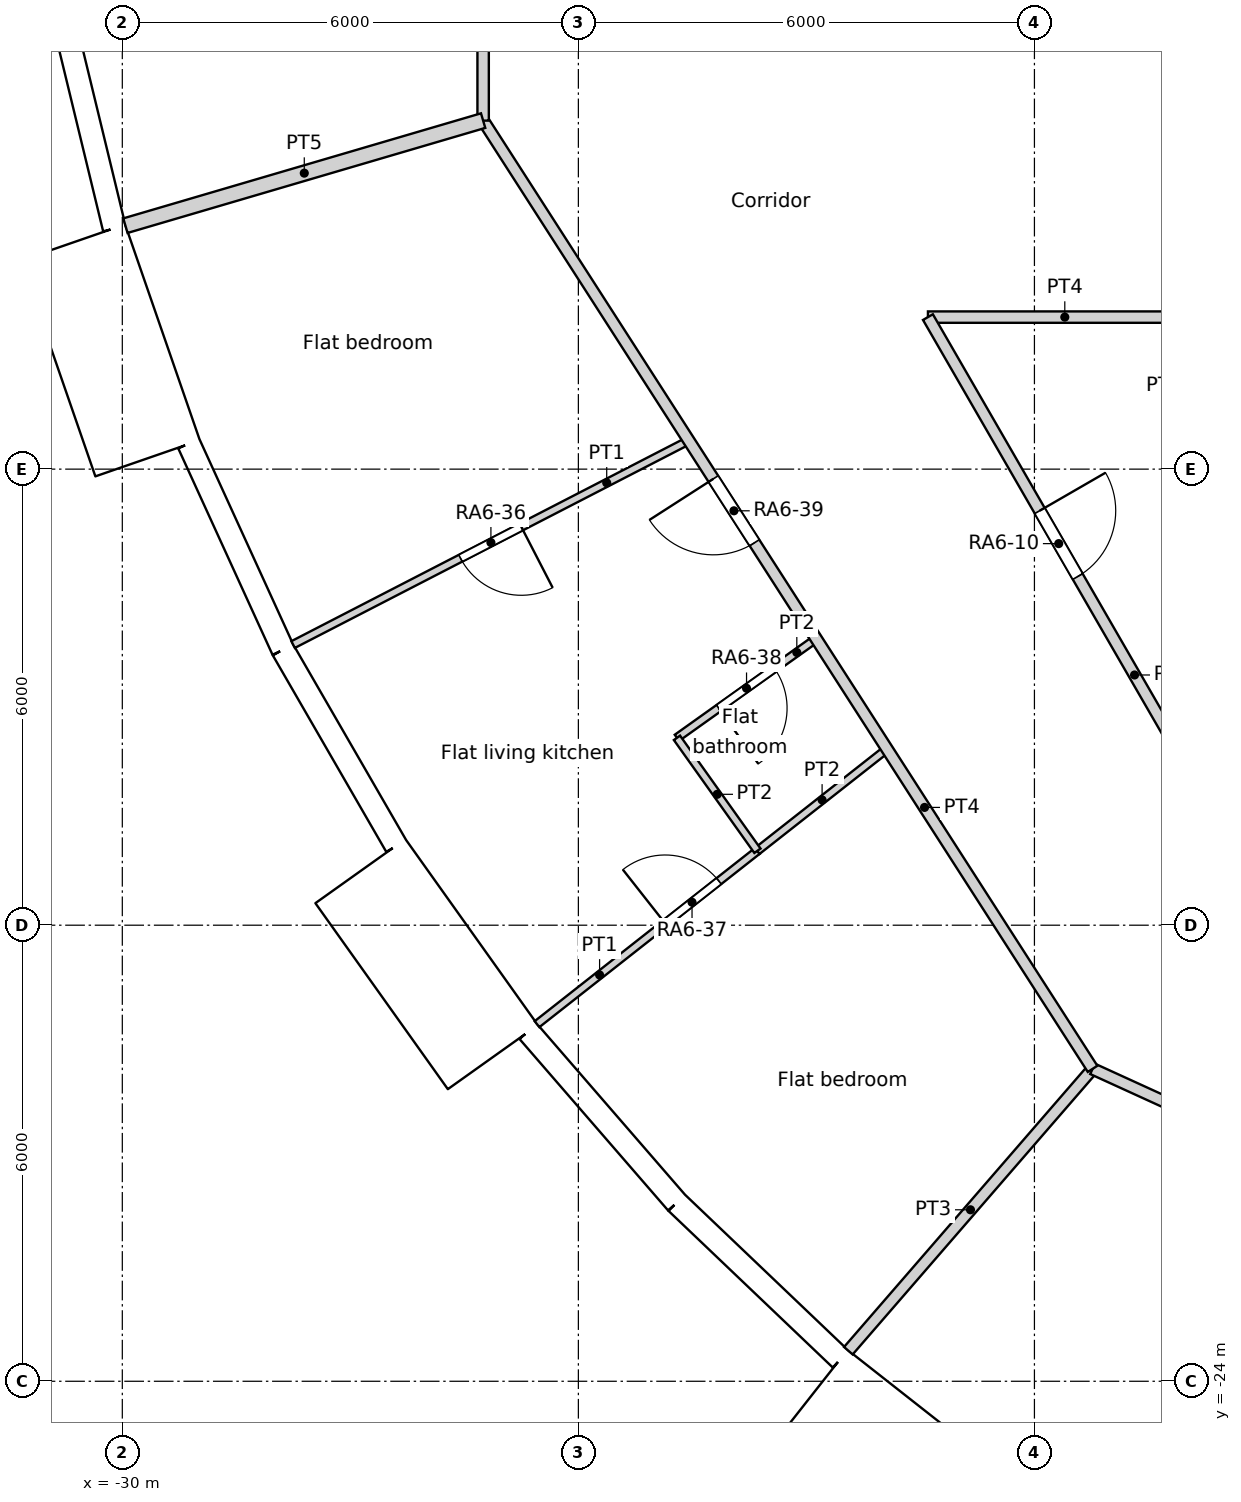
"""IFC4 building model, lengths in metres.
Left out: names, types, materials, properties, quantities, classifications, styles, units other than length and angle.
Written with IfcOpenShell. Run it as: python <this file> out.ifc"""

import sys

from ifc_helpers import new_model, si_unit, direction, frame, frame_2d, origin, origin_2d, place, context, subcontext, project, spatial, rectangle, circle, extrude, element, fill, save


model = new_model("IFC4")
c1 = context("Model", 3, precision=1e-05, world=origin(), true_north=direction((0.0, 1.0)))
c2 = subcontext(c1, "Body", "Model", "MODEL_VIEW")
j1 = project(units=[si_unit("LENGTHUNIT", "METRE"), si_unit("PLANEANGLEUNIT", "RADIAN")], contexts=[c1])
p1 = place(None, origin())
s1 = spatial("IfcSite", under=j1, at=p1, CompositionType="ELEMENT")
p2 = place(p1, origin())
s2 = spatial("IfcBuilding", under=s1, at=p2, CompositionType="ELEMENT")
p3 = place(p2, frame((0.0, 0.0, 82.2)))
s3 = spatial("IfcBuildingStorey", under=s2, at=p3, CompositionType="ELEMENT", Elevation=82.2)
for number, where, z_axis, x_axis in (
    (1, (-29.048, -8.529, 0.0), (0.0, 0.0, 1.0), (1.0, 0.0, 0.0)),
    (2, (-26.909, -13.873, 0.0), (0.0, 0.0, 1.0), (1.0, 0.0, 0.0)),
    (3, (-23.797, -18.715, 0.0), (0.0, 0.0, 1.0), (1.0, 0.0, 0.0)),
    (4, (-19.826, -22.88, 0.0), (0.0, 0.0, 1.0), (1.0, 0.0, 0.0)),
):
    element("IfcColumn", number, at=place(p3, frame(where, z_axis=z_axis, x_axis=x_axis)), inside=s3, PredefinedType="COLUMN", context=c2, shape_type="SweptSolid", body=[
        extrude(circle(Radius=0.6, at=origin_2d()), origin(), (0.0, 0.0, 1.0), 3.6),
    ])
for number, where, z_axis, x_axis in (
    (5, (-23.067, -8.396, 0.0), (0.0, 0.0, 1.0), (1.0, 0.0, 0.0)),
    (6, (-20.509, -13.489, 0.0), (0.0, 0.0, 1.0), (1.0, 0.0, 0.0)),
    (7, (-16.846, -17.855, 0.0), (0.0, 0.0, 1.0), (1.0, 0.0, 0.0)),
):
    element("IfcColumn", number, at=place(p3, frame(where, z_axis=z_axis, x_axis=x_axis)), inside=s3, PredefinedType="COLUMN", context=c2, shape_type="SweptSolid", body=[
        extrude(circle(Radius=0.65, at=origin_2d()), origin(), (0.0, 0.0, 1.0), 3.6),
    ])
p4 = place(p3, frame((-16.958, -8.167, 0.0), z_axis=(0.0, 0.0, 1.0), x_axis=(1.0, 0.0, 0.0)))
e8 = element("IfcColumn", 8, at=p4, inside=s3, PredefinedType="COLUMN", context=c2, shape_type="SweptSolid", body=[
    extrude(circle(Radius=0.7, at=origin_2d()), origin(), (0.0, 0.0, 1.0), 3.6),
])
p5 = place(p3, frame((-30.807, -5.938, 0.0), z_axis=(0.0, 0.0, 1.0), x_axis=(0.235743081534, -0.971815414319, 0.0)))
e9 = element("IfcWall", 9, at=p5, inside=s3, PredefinedType="SOLIDWALL", context=c2, shape_type="SweptSolid", body=[
    extrude(rectangle(XDim=2.979, YDim=0.3, at=frame_2d((1.49, 0.0))), origin(), (0.0, 0.0, 1.0), 3.15),
])
p6 = place(p5, frame((1.49, 0.0, 1.55)))
e10 = element("IfcOpeningElement", 10, at=p6, cuts=e9, PredefinedType="OPENING", context=c2, shape_type="SweptSolid", body=[
    extrude(circle(Radius=0.9, at=origin_2d()), frame((0.0, 0.16, 0.0), z_axis=(0.0, -1.0, 0.0), x_axis=(1.0, 0.0, 0.0)), (0.0, 0.0, 1.0), 0.32),
])
p7 = place(p3, frame((-30.649, -9.021, -0.45), z_axis=(0.0, 0.0, 1.0), x_axis=(0.327071431777, -0.944999618262, 0.0)))
e11 = element("IfcWall", 11, at=p7, inside=s3, PredefinedType="ELEMENTEDWALL", context=c2, shape_type="SweptSolid", body=[
    extrude(rectangle(XDim=3.0, YDim=1.45, at=frame_2d((1.5, 0.0))), origin(), (0.0, 0.0, 1.0), 3.6),
])
p8 = place(p7, frame((1.5, 0.0, 2.0)))
e12 = element("IfcOpeningElement", 12, at=p8, cuts=e11, PredefinedType="OPENING", context=c2, shape_type="SweptSolid", body=[
    extrude(circle(Radius=0.9, at=origin_2d()), frame((0.0, 0.735, 0.0), z_axis=(0.0, -1.0, 0.0), x_axis=(1.0, 0.0, 0.0)), (0.0, 0.0, 1.0), 1.47),
])
p9 = place(p3, frame((-29.125, -11.666, 0.0), z_axis=(0.0, 0.0, 1.0), x_axis=(0.415407317162, -0.909635509888, 0.0)))
e13 = element("IfcWall", 13, at=p9, inside=s3, PredefinedType="SOLIDWALL", context=c2, shape_type="SweptSolid", body=[
    extrude(rectangle(XDim=2.98, YDim=0.3, at=frame_2d((1.49, 0.0))), origin(), (0.0, 0.0, 1.0), 3.15),
])
p10 = place(p9, frame((1.49, 0.0, 1.55)))
e14 = element("IfcOpeningElement", 14, at=p10, cuts=e13, PredefinedType="OPENING", context=c2, shape_type="SweptSolid", body=[
    extrude(circle(Radius=0.9, at=origin_2d()), frame((0.0, 0.16, 0.0), z_axis=(0.0, -1.0, 0.0), x_axis=(1.0, 0.0, 0.0)), (0.0, 0.0, 1.0), 0.32),
])
p11 = place(p3, frame((-27.887, -14.377, 0.0), z_axis=(0.0, 0.0, 1.0), x_axis=(0.499999078476, -0.866025935826, 0.0)))
e15 = element("IfcWall", 15, at=p11, inside=s3, PredefinedType="SOLIDWALL", context=c2, shape_type="SweptSolid", body=[
    extrude(rectangle(XDim=2.979, YDim=0.3, at=frame_2d((1.49, 0.0))), origin(), (0.0, 0.0, 1.0), 3.15),
])
p12 = place(p11, frame((1.49, 0.0, 1.55)))
e16 = element("IfcOpeningElement", 16, at=p12, cuts=e15, PredefinedType="OPENING", context=c2, shape_type="SweptSolid", body=[
    extrude(circle(Radius=0.9, at=origin_2d()), frame((0.0, 0.16, 0.0), z_axis=(0.0, -1.0, 0.0), x_axis=(1.0, 0.0, 0.0)), (0.0, 0.0, 1.0), 0.32),
])
p13 = place(p3, frame((-26.866, -17.29, -0.45), z_axis=(0.0, 0.0, 1.0), x_axis=(0.580090570606, -0.814551981088, 0.0)))
e17 = element("IfcWall", 17, at=p13, inside=s3, PredefinedType="ELEMENTEDWALL", context=c2, shape_type="SweptSolid", body=[
    extrude(rectangle(XDim=3.0, YDim=1.45, at=frame_2d((1.5, 0.0))), origin(), (0.0, 0.0, 1.0), 3.6),
])
p14 = place(p13, frame((1.5, 0.0, 2.0)))
e18 = element("IfcOpeningElement", 18, at=p14, cuts=e17, PredefinedType="OPENING", context=c2, shape_type="SweptSolid", body=[
    extrude(circle(Radius=0.9, at=origin_2d()), frame((0.0, 0.735, 0.0), z_axis=(0.0, -1.0, 0.0), x_axis=(1.0, 0.0, 0.0)), (0.0, 0.0, 1.0), 1.47),
])
p15 = place(p3, frame((-24.658, -19.399, 0.0), z_axis=(0.0, 0.0, 1.0), x_axis=(0.654830712471, -0.755775587066, 0.0)))
e19 = element("IfcWall", 19, at=p15, inside=s3, PredefinedType="SOLIDWALL", context=c2, shape_type="SweptSolid", body=[
    extrude(rectangle(XDim=2.98, YDim=0.3, at=frame_2d((1.49, 0.0))), origin(), (0.0, 0.0, 1.0), 3.15),
])
p16 = place(p15, frame((1.49, 0.0, 1.55)))
e20 = element("IfcOpeningElement", 20, at=p16, cuts=e19, PredefinedType="OPENING", context=c2, shape_type="SweptSolid", body=[
    extrude(circle(Radius=0.9, at=origin_2d()), frame((0.0, 0.16, 0.0), z_axis=(0.0, -1.0, 0.0), x_axis=(1.0, 0.0, 0.0)), (0.0, 0.0, 1.0), 0.32),
])
p17 = place(p3, frame((-22.707, -21.651, 0.0), z_axis=(0.0, 0.0, 1.0), x_axis=(0.723744206617, -0.690068346896, 0.0)))
e21 = element("IfcWall", 21, at=p17, inside=s3, PredefinedType="SOLIDWALL", context=c2, shape_type="SweptSolid", body=[
    extrude(rectangle(XDim=2.98, YDim=0.3, at=frame_2d((1.49, 0.0))), origin(), (0.0, 0.0, 1.0), 3.15),
])
p18 = place(p17, frame((1.49, 0.0, 1.55)))
e22 = element("IfcOpeningElement", 22, at=p18, cuts=e21, PredefinedType="OPENING", context=c2, shape_type="SweptSolid", body=[
    extrude(circle(Radius=0.9, at=origin_2d()), frame((0.0, 0.16, 0.0), z_axis=(0.0, -1.0, 0.0), x_axis=(1.0, 0.0, 0.0)), (0.0, 0.0, 1.0), 0.32),
])
p19 = place(p3, frame((-20.907, -24.159, -0.45), z_axis=(0.0, 0.0, 1.0), x_axis=(0.786049992888, -0.618162930529, 0.0)))
e23 = element("IfcWall", 23, at=p19, inside=s3, PredefinedType="ELEMENTEDWALL", context=c2, shape_type="SweptSolid", body=[
    extrude(rectangle(XDim=3.0, YDim=1.45, at=frame_2d((1.5, 0.0))), origin(), (0.0, 0.0, 1.0), 3.6),
])
p20 = place(p19, frame((1.5, 0.0, 2.0)))
e24 = element("IfcOpeningElement", 24, at=p20, cuts=e23, PredefinedType="OPENING", context=c2, shape_type="SweptSolid", body=[
    extrude(circle(Radius=0.9, at=origin_2d()), frame((0.0, 0.735, 0.0), z_axis=(0.0, -1.0, 0.0), x_axis=(1.0, 0.0, 0.0)), (0.0, 0.0, 1.0), 1.47),
])
p21 = place(p3, frame((-19.401, -10.0, 0.0), z_axis=(0.0, 0.0, 1.0), x_axis=(1.0, 0.0, 0.0)))
e25 = element("IfcWall", 25, at=p21, inside=s3, PredefinedType="PARTITIONING", context=c2, shape_type="SweptSolid", body=[
    extrude(rectangle(XDim=3.601, YDim=0.15, at=frame_2d((1.8, 0.0))), origin(), (0.0, 0.0, 1.0), 3.15),
])
p22 = place(p3, frame((-19.401, -10.0, 0.0), z_axis=(0.0, 0.0, 1.0), x_axis=(0.499992689227, -0.86602962462, 0.0)))
e26 = element("IfcWall", 26, at=p22, inside=s3, PredefinedType="PARTITIONING", context=c2, shape_type="SweptSolid", body=[
    extrude(rectangle(XDim=6.882, YDim=0.15, at=frame_2d((3.441, 0.0))), origin(), (0.0, 0.0, 1.0), 3.15),
])
p23 = place(p22, frame((2.941, 0.0, 0.0)))
e27 = element("IfcOpeningElement", 27, at=p23, cuts=e26, PredefinedType="OPENING", context=c2, shape_type="SweptSolid", body=[
    extrude(rectangle(XDim=1.0, YDim=2.04, at=frame_2d((0.5, 1.02))), frame((0.0, 0.075, 0.0), z_axis=(0.0, -1.0, 0.0), x_axis=(1.0, 0.0, 0.0)), (0.0, 0.0, 1.0), 0.15),
])
p24 = place(p3, frame((-25.253, -7.415, 0.0), z_axis=(0.0, 0.0, 1.0), x_axis=(0.0, 1.0, 0.0)))
e28 = element("IfcWall", 28, at=p24, inside=s3, PredefinedType="PARTITIONING", context=c2, shape_type="SweptSolid", body=[
    extrude(rectangle(XDim=14.83, YDim=0.15, at=frame_2d((7.415, 0.0))), origin(), (0.0, 0.0, 1.0), 3.15),
])
p25 = place(p24, frame((6.665, 0.0, 0.0)))
e29 = element("IfcOpeningElement", 29, at=p25, cuts=e28, PredefinedType="OPENING", context=c2, shape_type="SweptSolid", body=[
    extrude(rectangle(XDim=1.5, YDim=2.1, at=frame_2d((0.75, 1.05))), frame((0.0, 0.075, 0.0), z_axis=(0.0, -1.0, 0.0), x_axis=(1.0, 0.0, 0.0)), (0.0, 0.0, 1.0), 0.15),
])
p26 = place(p3, frame((-25.253, -7.415, 0.0), z_axis=(0.0, 0.0, 1.0), x_axis=(0.540667724156, -0.841236240337, 0.0)))
e30 = element("IfcWall", 30, at=p26, inside=s3, PredefinedType="PARTITIONING", context=c2, shape_type="SweptSolid", body=[
    extrude(rectangle(XDim=14.83, YDim=0.15, at=frame_2d((7.415, 0.0))), origin(), (0.0, 0.0, 1.0), 3.15),
])
p27 = place(p26, frame((5.602, 0.0, 0.0)))
e31 = element("IfcOpeningElement", 31, at=p27, cuts=e30, PredefinedType="OPENING", context=c2, shape_type="SweptSolid", body=[
    extrude(rectangle(XDim=1.0, YDim=2.1, at=frame_2d((0.5, 1.05))), frame((0.0, 0.075, 0.0), z_axis=(0.0, -1.0, 0.0), x_axis=(1.0, 0.0, 0.0)), (0.0, 0.0, 1.0), 0.15),
])
p28 = place(p3, frame((-17.235, -19.89, 0.0), z_axis=(0.0, 0.0, 1.0), x_axis=(0.90960889055, -0.415465601743, 0.0)))
e32 = element("IfcWall", 32, at=p28, inside=s3, PredefinedType="PARTITIONING", context=c2, shape_type="SweptSolid", body=[
    extrude(rectangle(XDim=14.829, YDim=0.15, at=frame_2d((7.415, 0.0))), origin(), (0.0, 0.0, 1.0), 3.15),
])
p29 = place(p28, frame((6.914, 0.0, 0.0)))
e33 = element("IfcOpeningElement", 33, at=p29, cuts=e32, PredefinedType="OPENING", context=c2, shape_type="SweptSolid", body=[
    extrude(rectangle(XDim=1.0, YDim=2.04, at=frame_2d((0.5, 1.02))), frame((0.0, 0.075, 0.0), z_axis=(0.0, -1.0, 0.0), x_axis=(1.0, 0.0, 0.0)), (0.0, 0.0, 1.0), 0.15),
])
p30 = place(p3, frame((-29.959, -8.797, 0.0), z_axis=(0.0, 0.0, 1.0), x_axis=(0.959478767209, 0.281780934902, 0.0)))
e34 = element("IfcWall", 34, at=p30, inside=s3, PredefinedType="PARTITIONING", context=c2, shape_type="SweptSolid", body=[
    extrude(rectangle(XDim=4.905, YDim=0.2, at=frame_2d((2.452, 0.0))), origin(), (0.0, 0.0, 1.0), 3.15),
])
p31 = place(p3, frame((-27.753, -14.308, 0.0), z_axis=(0.0, 0.0, 1.0), x_axis=(0.88877955153, 0.45833493079, 0.0)))
e35 = element("IfcWall", 35, at=p31, inside=s3, PredefinedType="PARTITIONING", context=c2, shape_type="SweptSolid", body=[
    extrude(rectangle(XDim=5.856, YDim=0.1, at=frame_2d((2.928, 0.0))), origin(), (0.0, 0.0, 1.0), 3.15),
])
p32 = place(p31, frame((2.478, 0.0, 0.0)))
e36 = element("IfcOpeningElement", 36, at=p32, cuts=e35, PredefinedType="OPENING", context=c2, shape_type="SweptSolid", body=[
    extrude(rectangle(XDim=0.9, YDim=2.1, at=frame_2d((0.45, 1.05))), frame((0.0, 0.05, 0.0), z_axis=(0.0, -1.0, 0.0), x_axis=(1.0, 0.0, 0.0)), (0.0, 0.0, 1.0), 0.1),
])
p33 = place(p3, frame((-24.544, -19.302, 0.0), z_axis=(0.0, 0.0, 1.0), x_axis=(0.785987576403, 0.618242290481, 0.0)))
e37 = element("IfcWall", 37, at=p33, inside=s3, PredefinedType="PARTITIONING", context=c2, shape_type="SweptSolid", body=[
    extrude(rectangle(XDim=3.689, YDim=0.1, at=frame_2d((1.845, 0.0))), origin(), (0.0, 0.0, 1.0), 3.15),
])
p34 = place(p33, frame((2.145, 0.0, 0.0)))
e38 = element("IfcOpeningElement", 38, at=p34, cuts=e37, PredefinedType="OPENING", context=c2, shape_type="SweptSolid", body=[
    extrude(rectangle(XDim=0.9, YDim=2.1, at=frame_2d((0.45, 1.05))), frame((0.0, 0.05, 0.0), z_axis=(0.0, -1.0, 0.0), x_axis=(1.0, 0.0, 0.0)), (0.0, 0.0, 1.0), 0.1),
])
p35 = place(p3, frame((-22.703, -15.535, 0.0), z_axis=(0.0, 0.0, 1.0), x_axis=(0.814525331415, 0.580127989743, 0.0)))
e39 = element("IfcWall", 39, at=p35, inside=s3, PredefinedType="PARTITIONING", context=c2, shape_type="SweptSolid", body=[
    extrude(rectangle(XDim=2.248, YDim=0.1, at=frame_2d((1.124, 0.0))), origin(), (0.0, 0.0, 1.0), 3.15),
])
p36 = place(p35, frame((0.674, 0.0, 0.0)))
e40 = element("IfcOpeningElement", 40, at=p36, cuts=e39, PredefinedType="OPENING", context=c2, shape_type="SweptSolid", body=[
    extrude(rectangle(XDim=0.9, YDim=2.0, at=frame_2d((0.45, 1.0))), frame((0.0, 0.05, 0.0), z_axis=(0.0, -1.0, 0.0), x_axis=(1.0, 0.0, 0.0)), (0.0, 0.0, 1.0), 0.1),
])
p37 = place(p3, frame((-22.703, -15.535, 0.0), z_axis=(0.0, 0.0, 1.0), x_axis=(0.580275898497, -0.814419966371, 0.0)))
e41 = element("IfcWall", 41, at=p37, inside=s3, PredefinedType="PARTITIONING", context=c2, shape_type="SweptSolid", body=[
    extrude(rectangle(XDim=1.825, YDim=0.1, at=frame_2d((0.912, 0.0))), origin(), (0.0, 0.0, 1.0), 3.15),
])
p38 = place(p3, frame((-21.647, -17.023, 0.0), z_axis=(0.0, 0.0, 1.0), x_axis=(0.786138836794, 0.618049940769, 0.0)))
e42 = element("IfcWall", 42, at=p38, inside=s3, PredefinedType="PARTITIONING", context=c2, shape_type="SweptSolid", body=[
    extrude(rectangle(XDim=2.171, YDim=0.1, at=frame_2d((1.086, 0.0))), origin(), (0.0, 0.0, 1.0), 3.15),
])
p39 = place(p3, frame((-20.448, -23.598, 0.0), z_axis=(0.0, 0.0, 1.0), x_axis=(0.654847179409, 0.755761319214, 0.0)))
e43 = element("IfcWall", 43, at=p39, inside=s3, PredefinedType="PARTITIONING", context=c2, shape_type="SweptSolid", body=[
    extrude(rectangle(XDim=4.906, YDim=0.15, at=frame_2d((2.453, 0.0))), origin(), (0.0, 0.0, 1.0), 3.15),
])
p40 = place(p6, origin())
e44 = element("IfcWindow", 44, at=p40, inside=s3, PartitioningType="SINGLE_PANEL", PredefinedType="WINDOW", context=c2, shape_type="SweptSolid", body=[
    extrude(circle(Radius=0.9, at=origin_2d()), frame((0.0, 0.12, 0.0), z_axis=(0.0, -1.0, 0.0), x_axis=(1.0, 0.0, 0.0)), (0.0, 0.0, 1.0), 0.1),
])
fill(e10, e44)
p41 = place(p8, origin())
e45 = element("IfcWindow", 45, at=p41, inside=s3, PartitioningType="SINGLE_PANEL", PredefinedType="WINDOW", context=c2, shape_type="SweptSolid", body=[
    extrude(circle(Radius=0.9, at=origin_2d()), frame((0.0, 0.695, 0.0), z_axis=(0.0, -1.0, 0.0), x_axis=(1.0, 0.0, 0.0)), (0.0, 0.0, 1.0), 0.1),
])
fill(e12, e45)
p42 = place(p10, origin())
e46 = element("IfcWindow", 46, at=p42, inside=s3, PartitioningType="SINGLE_PANEL", PredefinedType="WINDOW", context=c2, shape_type="SweptSolid", body=[
    extrude(circle(Radius=0.9, at=origin_2d()), frame((0.0, 0.12, 0.0), z_axis=(0.0, -1.0, 0.0), x_axis=(1.0, 0.0, 0.0)), (0.0, 0.0, 1.0), 0.1),
])
fill(e14, e46)
p43 = place(p12, origin())
e47 = element("IfcWindow", 47, at=p43, inside=s3, PartitioningType="SINGLE_PANEL", PredefinedType="WINDOW", context=c2, shape_type="SweptSolid", body=[
    extrude(circle(Radius=0.9, at=origin_2d()), frame((0.0, 0.12, 0.0), z_axis=(0.0, -1.0, 0.0), x_axis=(1.0, 0.0, 0.0)), (0.0, 0.0, 1.0), 0.1),
])
fill(e16, e47)
p44 = place(p14, origin())
e48 = element("IfcWindow", 48, at=p44, inside=s3, PartitioningType="SINGLE_PANEL", PredefinedType="WINDOW", context=c2, shape_type="SweptSolid", body=[
    extrude(circle(Radius=0.9, at=origin_2d()), frame((0.0, 0.695, 0.0), z_axis=(0.0, -1.0, 0.0), x_axis=(1.0, 0.0, 0.0)), (0.0, 0.0, 1.0), 0.1),
])
fill(e18, e48)
p45 = place(p16, origin())
e49 = element("IfcWindow", 49, at=p45, inside=s3, PartitioningType="SINGLE_PANEL", PredefinedType="WINDOW", context=c2, shape_type="SweptSolid", body=[
    extrude(circle(Radius=0.9, at=origin_2d()), frame((0.0, 0.12, 0.0), z_axis=(0.0, -1.0, 0.0), x_axis=(1.0, 0.0, 0.0)), (0.0, 0.0, 1.0), 0.1),
])
fill(e20, e49)
p46 = place(p18, origin())
e50 = element("IfcWindow", 50, at=p46, inside=s3, PartitioningType="SINGLE_PANEL", PredefinedType="WINDOW", context=c2, shape_type="SweptSolid", body=[
    extrude(circle(Radius=0.9, at=origin_2d()), frame((0.0, 0.12, 0.0), z_axis=(0.0, -1.0, 0.0), x_axis=(1.0, 0.0, 0.0)), (0.0, 0.0, 1.0), 0.1),
])
fill(e22, e50)
p47 = place(p20, origin())
e51 = element("IfcWindow", 51, at=p47, inside=s3, PartitioningType="SINGLE_PANEL", PredefinedType="WINDOW", context=c2, shape_type="SweptSolid", body=[
    extrude(circle(Radius=0.9, at=origin_2d()), frame((0.0, 0.695, 0.0), z_axis=(0.0, -1.0, 0.0), x_axis=(1.0, 0.0, 0.0)), (0.0, 0.0, 1.0), 0.1),
])
fill(e24, e51)
p48 = place(p23, origin())
e52 = element("IfcDoor", 52, at=p48, inside=s3, OperationType="SINGLE_SWING_LEFT", PredefinedType="DOOR", context=c2, shape_type="SweptSolid", body=[
    extrude(rectangle(XDim=1.0, YDim=2.04, at=frame_2d((0.5, 1.02))), frame((0.0, 0.025, 0.0), z_axis=(0.0, -1.0, 0.0), x_axis=(1.0, 0.0, 0.0)), (0.0, 0.0, 1.0), 0.05),
])
fill(e27, e52)
p49 = place(p32, origin())
e53 = element("IfcDoor", 53, at=p49, inside=s3, OperationType="SINGLE_SWING_LEFT", PredefinedType="DOOR", context=c2, shape_type="SweptSolid", body=[
    extrude(rectangle(XDim=0.9, YDim=2.1, at=frame_2d((0.45, 1.05))), frame((0.0, 0.025, 0.0), z_axis=(0.0, -1.0, 0.0), x_axis=(1.0, 0.0, 0.0)), (0.0, 0.0, 1.0), 0.05),
])
fill(e36, e53)
p50 = place(p34, origin())
e54 = element("IfcDoor", 54, at=p50, inside=s3, OperationType="SINGLE_SWING_LEFT", PredefinedType="DOOR", context=c2, shape_type="SweptSolid", body=[
    extrude(rectangle(XDim=0.9, YDim=2.1, at=frame_2d((0.45, 1.05))), frame((0.0, 0.025, 0.0), z_axis=(0.0, -1.0, 0.0), x_axis=(1.0, 0.0, 0.0)), (0.0, 0.0, 1.0), 0.05),
])
fill(e38, e54)
p51 = place(p36, origin())
e55 = element("IfcDoor", 55, at=p51, inside=s3, OperationType="SINGLE_SWING_RIGHT", PredefinedType="DOOR", context=c2, shape_type="SweptSolid", body=[
    extrude(rectangle(XDim=0.9, YDim=2.0, at=frame_2d((0.45, 1.0))), frame((0.0, 0.025, 0.0), z_axis=(0.0, -1.0, 0.0), x_axis=(1.0, 0.0, 0.0)), (0.0, 0.0, 1.0), 0.05),
])
fill(e40, e55)
p52 = place(p27, origin())
e56 = element("IfcDoor", 56, at=p52, inside=s3, OperationType="SINGLE_SWING_RIGHT", PredefinedType="DOOR", context=c2, shape_type="SweptSolid", body=[
    extrude(rectangle(XDim=1.0, YDim=2.1, at=frame_2d((0.5, 1.05))), frame((0.0, 0.025, 0.0), z_axis=(0.0, -1.0, 0.0), x_axis=(1.0, 0.0, 0.0)), (0.0, 0.0, 1.0), 0.05),
])
fill(e31, e56)
save(model, sys.argv[1])
